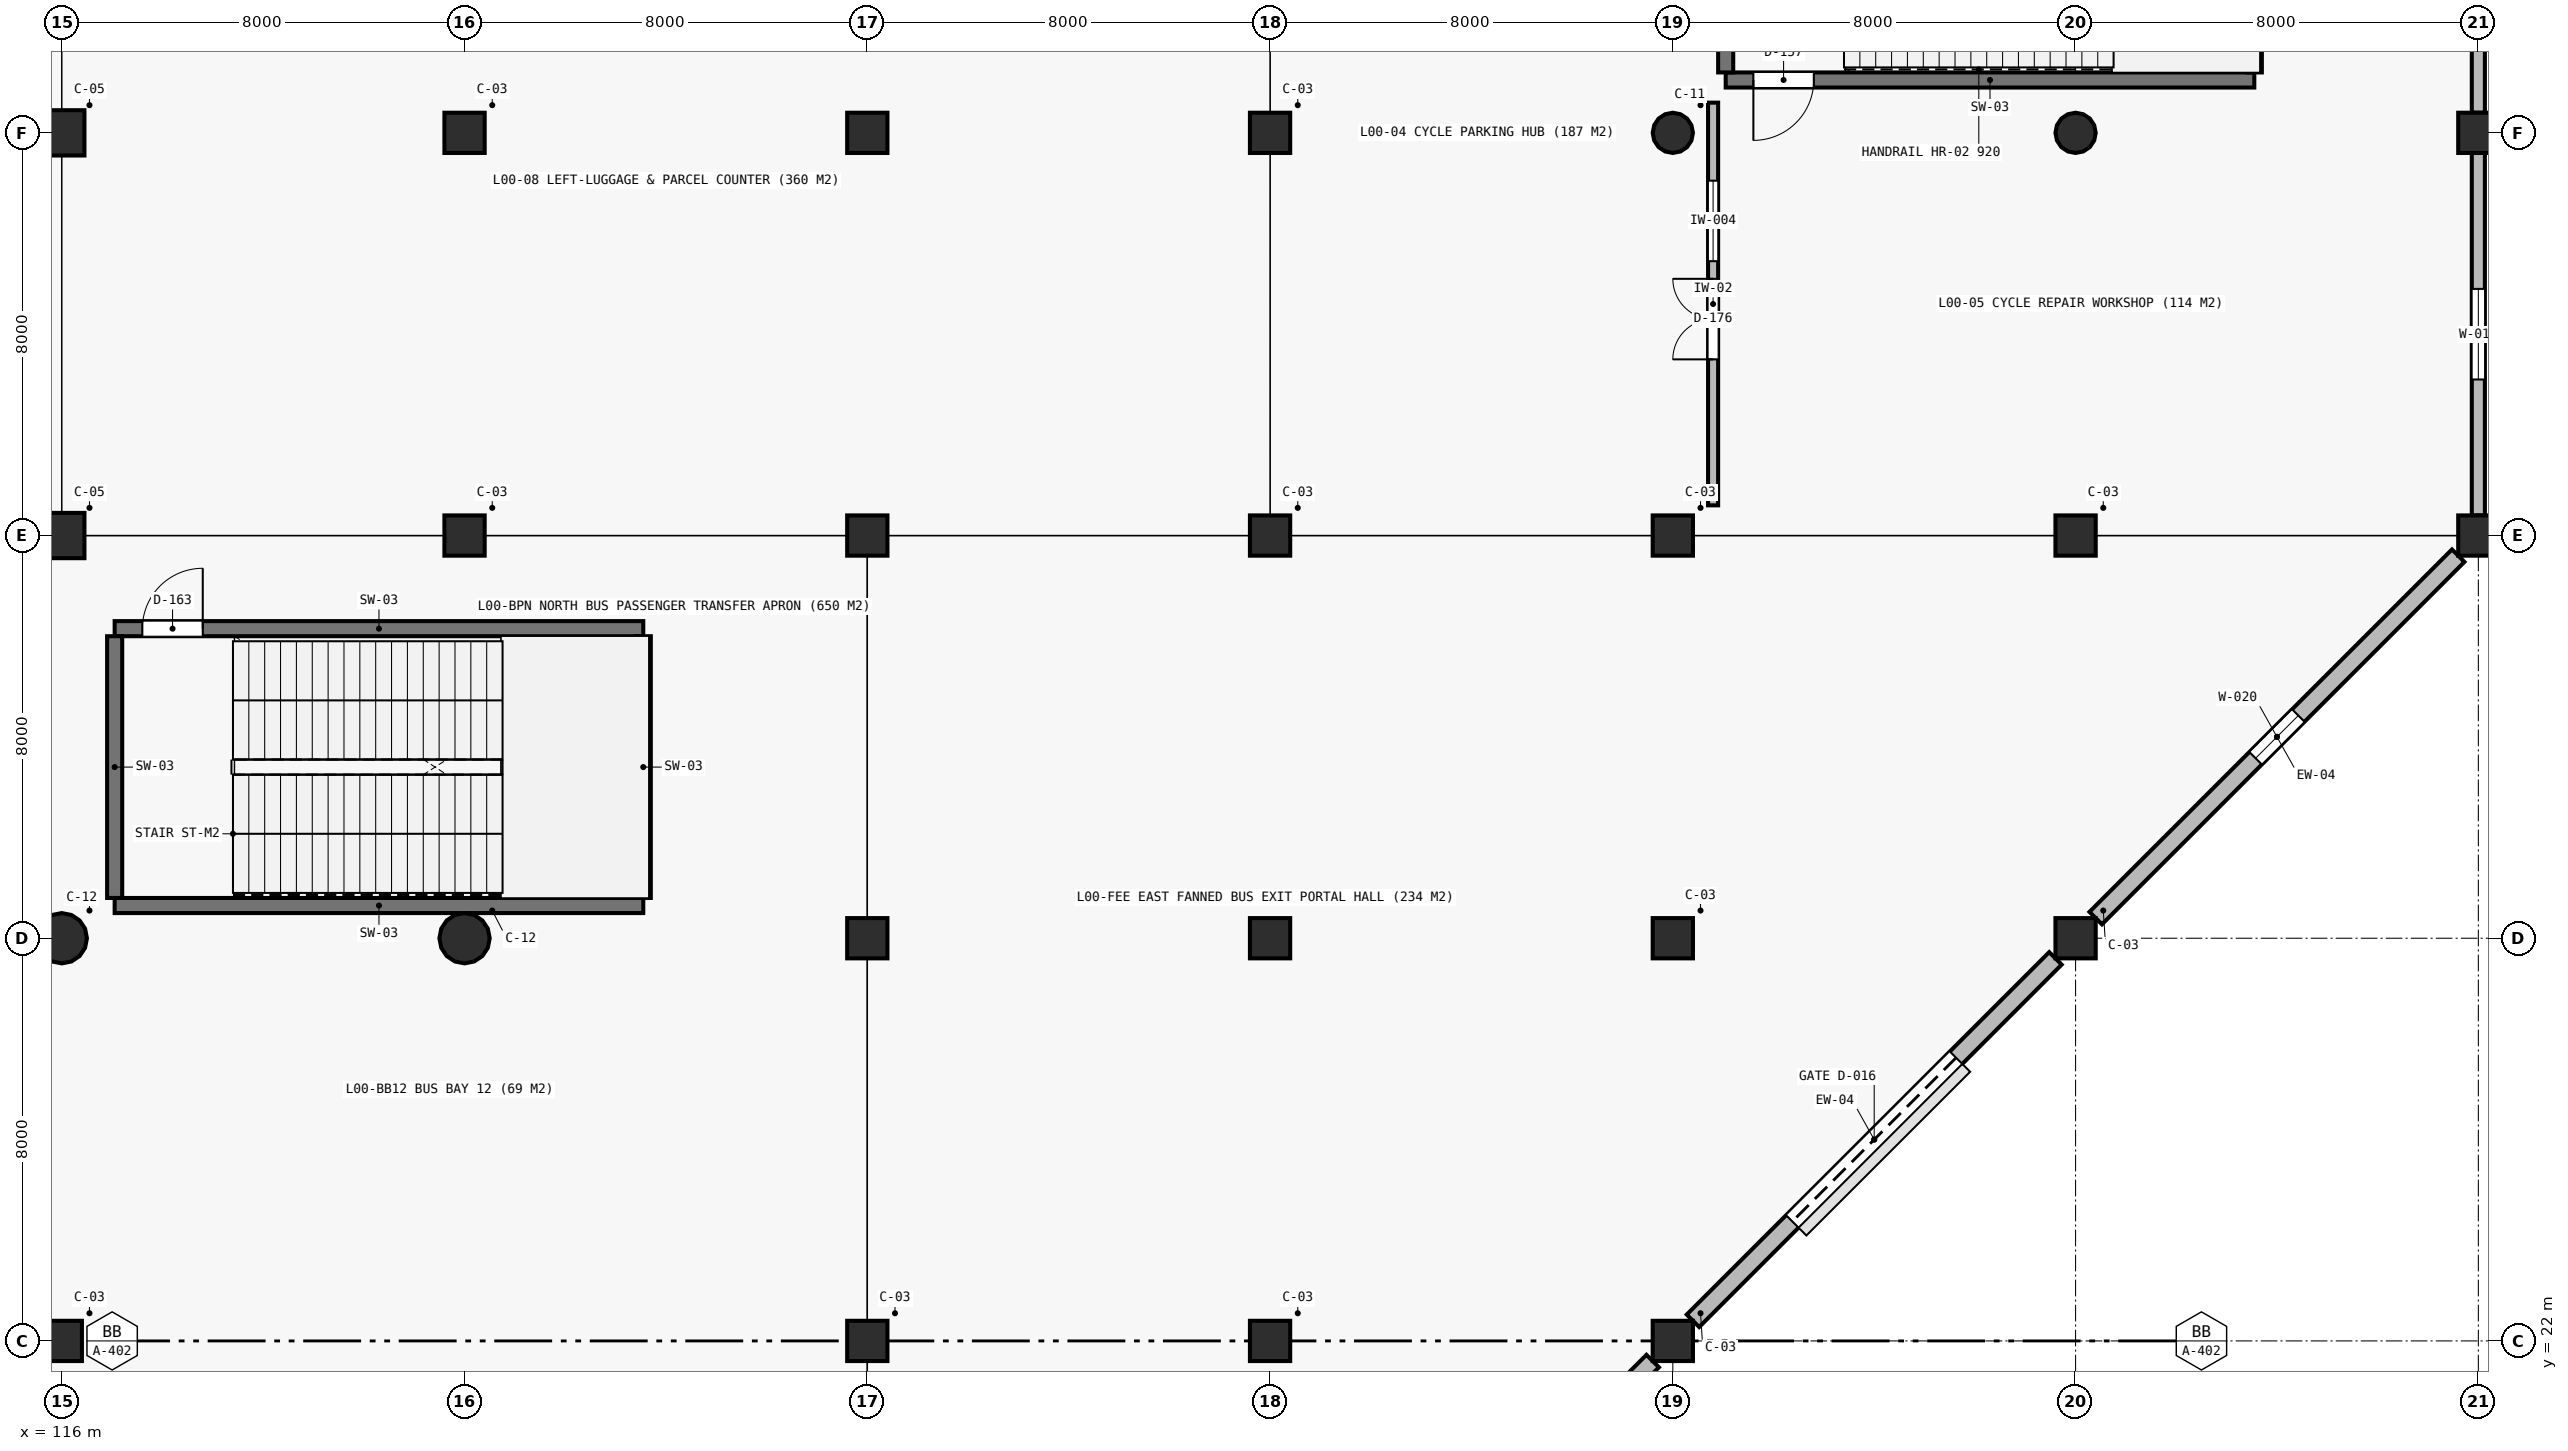
"""IFC4 building model, lengths in metres.
Left out: names, types, materials, properties, quantities, classifications, styles, units other than length and angle.
Written with IfcOpenShell. Run it as: python <this file> out.ifc"""

import sys

from ifc_helpers import new_model, si_unit, direction, frame, frame_2d, origin, origin_2d, place, context, subcontext, project, spatial, rectangle, circle, extrude, element, fill, save


model = new_model("IFC4")
c1 = context("Model", 3, precision=1e-05, world=origin(), true_north=direction((0.0, 1.0)))
c2 = subcontext(c1, "Body", "Model", "MODEL_VIEW")
j1 = project(units=[si_unit("LENGTHUNIT", "METRE"), si_unit("PLANEANGLEUNIT", "RADIAN")], contexts=[c1])
p1 = place(None, origin())
s1 = spatial("IfcSite", under=j1, at=p1, CompositionType="ELEMENT")
p2 = place(p1, origin())
s2 = spatial("IfcBuilding", under=s1, at=p2, CompositionType="ELEMENT")
p3 = place(p2, origin())
s3 = spatial("IfcBuildingStorey", under=s2, at=p3, CompositionType="ELEMENT", Elevation=0.0)
p4 = place(p3, frame((116.0, 22.0, 0.0), z_axis=(0.0, 0.0, 1.0), x_axis=(1.0, 0.0, 0.0)))
e1 = element("IfcColumn", 1, at=p4, inside=s3, PredefinedType="COLUMN", context=c2, shape_type="SweptSolid", body=[
    extrude(rectangle(XDim=0.8, YDim=0.8, at=origin_2d()), origin(), (0.0, 0.0, 1.0), 6.6),
])
p5 = place(p3, frame((116.0, 30.0, 0.0), z_axis=(0.0, 0.0, 1.0), x_axis=(1.0, 0.0, 0.0)))
e2 = element("IfcColumn", 2, at=p5, inside=s3, PredefinedType="COLUMN", context=c2, shape_type="SweptSolid", body=[
    extrude(circle(Radius=0.5, at=origin_2d()), origin(), (0.0, 0.0, 1.0), 6.02),
])
for number, where, z_axis, x_axis in (
    (3, (116.0, 38.0, 0.0), (0.0, 0.0, 1.0), (1.0, 0.0, 0.0)),
    (4, (116.0, 46.0, 0.0), (0.0, 0.0, 1.0), (1.0, 0.0, 0.0)),
):
    element("IfcColumn", number, at=place(p3, frame(where, z_axis=z_axis, x_axis=x_axis)), inside=s3, PredefinedType="COLUMN", context=c2, shape_type="SweptSolid", body=[
        extrude(rectangle(XDim=0.9, YDim=0.9, at=origin_2d()), origin(), (0.0, 0.0, 1.0), 6.02),
    ])
p6 = place(p3, frame((124.0, 30.0, 0.0), z_axis=(0.0, 0.0, 1.0), x_axis=(1.0, 0.0, 0.0)))
e5 = element("IfcColumn", 5, at=p6, inside=s3, PredefinedType="COLUMN", context=c2, shape_type="SweptSolid", body=[
    extrude(circle(Radius=0.5, at=origin_2d()), origin(), (0.0, 0.0, 1.0), 6.02),
])
for number, where, z_axis, x_axis in (
    (6, (124.0, 38.0, 0.0), (0.0, 0.0, 1.0), (1.0, 0.0, 0.0)),
    (7, (124.0, 46.0, 0.0), (0.0, 0.0, 1.0), (1.0, 0.0, 0.0)),
):
    element("IfcColumn", number, at=place(p3, frame(where, z_axis=z_axis, x_axis=x_axis)), inside=s3, PredefinedType="COLUMN", context=c2, shape_type="SweptSolid", body=[
        extrude(rectangle(XDim=0.8, YDim=0.8, at=origin_2d()), origin(), (0.0, 0.0, 1.0), 6.02),
    ])
p7 = place(p3, frame((132.0, 22.0, 0.0), z_axis=(0.0, 0.0, 1.0), x_axis=(1.0, 0.0, 0.0)))
e8 = element("IfcColumn", 8, at=p7, inside=s3, PredefinedType="COLUMN", context=c2, shape_type="SweptSolid", body=[
    extrude(rectangle(XDim=0.8, YDim=0.8, at=origin_2d()), origin(), (0.0, 0.0, 1.0), 6.6),
])
for number, where, z_axis, x_axis in (
    (9, (132.0, 30.0, 0.0), (0.0, 0.0, 1.0), (1.0, 0.0, 0.0)),
    (10, (132.0, 38.0, 0.0), (0.0, 0.0, 1.0), (1.0, 0.0, 0.0)),
    (11, (132.0, 46.0, 0.0), (0.0, 0.0, 1.0), (1.0, 0.0, 0.0)),
):
    element("IfcColumn", number, at=place(p3, frame(where, z_axis=z_axis, x_axis=x_axis)), inside=s3, PredefinedType="COLUMN", context=c2, shape_type="SweptSolid", body=[
        extrude(rectangle(XDim=0.8, YDim=0.8, at=origin_2d()), origin(), (0.0, 0.0, 1.0), 6.02),
    ])
for number, where, z_axis, x_axis in (
    (12, (140.0, 22.0, 0.0), (0.0, 0.0, 1.0), (1.0, 0.0, 0.0)),
    (13, (140.0, 30.0, 0.0), (0.0, 0.0, 1.0), (1.0, 0.0, 0.0)),
):
    element("IfcColumn", number, at=place(p3, frame(where, z_axis=z_axis, x_axis=x_axis)), inside=s3, PredefinedType="COLUMN", context=c2, shape_type="SweptSolid", body=[
        extrude(rectangle(XDim=0.8, YDim=0.8, at=origin_2d()), origin(), (0.0, 0.0, 1.0), 6.6),
    ])
for number, where, z_axis, x_axis in (
    (14, (140.0, 38.0, 0.0), (0.0, 0.0, 1.0), (1.0, 0.0, 0.0)),
    (15, (140.0, 46.0, 0.0), (0.0, 0.0, 1.0), (1.0, 0.0, 0.0)),
):
    element("IfcColumn", number, at=place(p3, frame(where, z_axis=z_axis, x_axis=x_axis)), inside=s3, PredefinedType="COLUMN", context=c2, shape_type="SweptSolid", body=[
        extrude(rectangle(XDim=0.8, YDim=0.8, at=origin_2d()), origin(), (0.0, 0.0, 1.0), 6.02),
    ])
for number, where, z_axis, x_axis in (
    (16, (148.0, 22.0, 0.0), (0.0, 0.0, 1.0), (1.0, 0.0, 0.0)),
    (17, (148.0, 30.0, 0.0), (0.0, 0.0, 1.0), (1.0, 0.0, 0.0)),
):
    element("IfcColumn", number, at=place(p3, frame(where, z_axis=z_axis, x_axis=x_axis)), inside=s3, PredefinedType="COLUMN", context=c2, shape_type="SweptSolid", body=[
        extrude(rectangle(XDim=0.8, YDim=0.8, at=origin_2d()), origin(), (0.0, 0.0, 1.0), 6.6),
    ])
p8 = place(p3, frame((148.0, 38.0, 0.0), z_axis=(0.0, 0.0, 1.0), x_axis=(1.0, 0.0, 0.0)))
e18 = element("IfcColumn", 18, at=p8, inside=s3, PredefinedType="COLUMN", context=c2, shape_type="SweptSolid", body=[
    extrude(rectangle(XDim=0.8, YDim=0.8, at=origin_2d()), origin(), (0.0, 0.0, 1.0), 6.02),
])
p9 = place(p3, frame((148.0, 46.0, 0.0), z_axis=(0.0, 0.0, 1.0), x_axis=(1.0, 0.0, 0.0)))
e19 = element("IfcColumn", 19, at=p9, inside=s3, PredefinedType="COLUMN", context=c2, shape_type="SweptSolid", body=[
    extrude(circle(Radius=0.4, at=origin_2d()), origin(), (0.0, 0.0, 1.0), 6.02),
])
p10 = place(p3, frame((156.0, 30.0, 0.0), z_axis=(0.0, 0.0, 1.0), x_axis=(1.0, 0.0, 0.0)))
e20 = element("IfcColumn", 20, at=p10, inside=s3, PredefinedType="COLUMN", context=c2, shape_type="SweptSolid", body=[
    extrude(rectangle(XDim=0.8, YDim=0.8, at=origin_2d()), origin(), (0.0, 0.0, 1.0), 6.6),
])
p11 = place(p3, frame((156.0, 38.0, 0.0), z_axis=(0.0, 0.0, 1.0), x_axis=(1.0, 0.0, 0.0)))
e21 = element("IfcColumn", 21, at=p11, inside=s3, PredefinedType="COLUMN", context=c2, shape_type="SweptSolid", body=[
    extrude(rectangle(XDim=0.8, YDim=0.8, at=origin_2d()), origin(), (0.0, 0.0, 1.0), 6.02),
])
p12 = place(p3, frame((156.0, 46.0, 0.0), z_axis=(0.0, 0.0, 1.0), x_axis=(1.0, 0.0, 0.0)))
e22 = element("IfcColumn", 22, at=p12, inside=s3, PredefinedType="COLUMN", context=c2, shape_type="SweptSolid", body=[
    extrude(circle(Radius=0.4, at=origin_2d()), origin(), (0.0, 0.0, 1.0), 6.02),
])
for number, where, z_axis, x_axis in (
    (23, (164.0, 38.0, 0.0), (0.0, 0.0, 1.0), (1.0, 0.0, 0.0)),
    (24, (164.0, 46.0, 0.0), (0.0, 0.0, 1.0), (1.0, 0.0, 0.0)),
):
    element("IfcColumn", number, at=place(p3, frame(where, z_axis=z_axis, x_axis=x_axis)), inside=s3, PredefinedType="COLUMN", context=c2, shape_type="SweptSolid", body=[
        extrude(rectangle(XDim=0.8, YDim=0.8, at=origin_2d()), origin(), (0.0, 0.0, 1.0), 6.02),
    ])
p13 = place(p3, frame((149.05, 47.05, 0.0), z_axis=(0.0, 0.0, 1.0), x_axis=(1.0, 0.0, 0.0)))
e25 = element("IfcWall", 25, at=p13, inside=s3, PredefinedType="SHEAR", context=c2, shape_type="SweptSolid", body=[
    extrude(rectangle(XDim=10.5, YDim=0.3, at=frame_2d((5.25, 0.0))), origin(), (0.0, 0.0, 1.0), 6.02),
])
p14 = place(p13, frame((0.55, 0.0, 0.0)))
e26 = element("IfcOpeningElement", 26, at=p14, cuts=e25, PredefinedType="OPENING", context=c2, shape_type="SweptSolid", body=[
    extrude(rectangle(XDim=1.2, YDim=2.2, at=frame_2d((0.6, 1.1))), frame((0.0, 0.16, 0.0), z_axis=(0.0, -1.0, 0.0), x_axis=(1.0, 0.0, 0.0)), (0.0, 0.0, 1.0), 0.32),
])
for number, where, z_axis, x_axis in (
    (27, (149.05, 47.2, 0.0), (0.0, 0.0, 1.0), (0.0, 1.0, 0.0)),
    (28, (159.55, 47.2, 0.0), (0.0, 0.0, 1.0), (0.0, 1.0, 0.0)),
):
    element("IfcWall", number, at=place(p3, frame(where, z_axis=z_axis, x_axis=x_axis)), inside=s3, PredefinedType="SHEAR", context=c2, shape_type="SweptSolid", body=[
        extrude(rectangle(XDim=5.2, YDim=0.3, at=frame_2d((2.6, 0.0))), origin(), (0.0, 0.0, 1.0), 6.02),
    ])
p15 = place(p3, frame((117.05, 36.15, 0.0), z_axis=(0.0, 0.0, 1.0), x_axis=(1.0, 0.0, 0.0)))
e29 = element("IfcWall", 29, at=p15, inside=s3, PredefinedType="SHEAR", context=c2, shape_type="SweptSolid", body=[
    extrude(rectangle(XDim=10.5, YDim=0.3, at=frame_2d((5.25, 0.0))), origin(), (0.0, 0.0, 1.0), 6.02),
])
p16 = place(p15, frame((0.55, 0.0, 0.0)))
e30 = element("IfcOpeningElement", 30, at=p16, cuts=e29, PredefinedType="OPENING", context=c2, shape_type="SweptSolid", body=[
    extrude(rectangle(XDim=1.2, YDim=2.2, at=frame_2d((0.6, 1.1))), frame((0.0, 0.16, 0.0), z_axis=(0.0, -1.0, 0.0), x_axis=(1.0, 0.0, 0.0)), (0.0, 0.0, 1.0), 0.32),
])
p17 = place(p3, frame((117.05, 30.65, 0.0), z_axis=(0.0, 0.0, 1.0), x_axis=(1.0, 0.0, 0.0)))
e31 = element("IfcWall", 31, at=p17, inside=s3, PredefinedType="SHEAR", context=c2, shape_type="SweptSolid", body=[
    extrude(rectangle(XDim=10.5, YDim=0.3, at=frame_2d((5.25, 0.0))), origin(), (0.0, 0.0, 1.0), 6.02),
])
for number, where, z_axis, x_axis in (
    (32, (117.05, 30.8, 0.0), (0.0, 0.0, 1.0), (0.0, 1.0, 0.0)),
    (33, (127.55, 30.8, 0.0), (0.0, 0.0, 1.0), (0.0, 1.0, 0.0)),
):
    element("IfcWall", number, at=place(p3, frame(where, z_axis=z_axis, x_axis=x_axis)), inside=s3, PredefinedType="SHEAR", context=c2, shape_type="SweptSolid", body=[
        extrude(rectangle(XDim=5.2, YDim=0.3, at=frame_2d((2.6, 0.0))), origin(), (0.0, 0.0, 1.0), 6.02),
    ])
p18 = place(p3, frame((164.0, 53.6, 0.0), z_axis=(0.0, 0.0, 1.0), x_axis=(0.0, -1.0, 0.0)))
e34 = element("IfcWall", 34, at=p18, inside=s3, PredefinedType="STANDARD", context=c2, shape_type="SweptSolid", body=[
    extrude(rectangle(XDim=7.2, YDim=0.26, at=frame_2d((3.6, 0.0))), origin(), (0.0, 0.0, 1.0), 5.408),
])
p19 = place(p18, frame((2.525, 0.0, 0.95)))
e35 = element("IfcOpeningElement", 35, at=p19, cuts=e34, PredefinedType="OPENING", context=c2, shape_type="SweptSolid", body=[
    extrude(rectangle(XDim=2.15, YDim=1.5, at=frame_2d((1.075, 0.75))), frame((0.0, 0.14, 0.0), z_axis=(0.0, -1.0, 0.0), x_axis=(1.0, 0.0, 0.0)), (0.0, 0.0, 1.0), 0.28),
])
p20 = place(p3, frame((164.0, 45.6, 0.0), z_axis=(0.0, 0.0, 1.0), x_axis=(0.0, -1.0, 0.0)))
e36 = element("IfcWall", 36, at=p20, inside=s3, PredefinedType="STANDARD", context=c2, shape_type="SweptSolid", body=[
    extrude(rectangle(XDim=7.2, YDim=0.26, at=frame_2d((3.6, 0.0))), origin(), (0.0, 0.0, 1.0), 5.408),
])
p21 = place(p20, frame((2.7, 0.0, 0.95)))
e37 = element("IfcOpeningElement", 37, at=p21, cuts=e36, PredefinedType="OPENING", context=c2, shape_type="SweptSolid", body=[
    extrude(rectangle(XDim=1.8, YDim=1.6, at=frame_2d((0.9, 0.8))), frame((0.0, 0.14, 0.0), z_axis=(0.0, -1.0, 0.0), x_axis=(1.0, 0.0, 0.0)), (0.0, 0.0, 1.0), 0.28),
])
p22 = place(p3, frame((163.6, 37.6, 0.0), z_axis=(0.0, 0.0, 1.0), x_axis=(-0.707106781187, -0.707106781187, 0.0)))
e38 = element("IfcWall", 38, at=p22, inside=s3, PredefinedType="STANDARD", context=c2, shape_type="SweptSolid", body=[
    extrude(rectangle(XDim=10.183, YDim=0.35, at=frame_2d((5.091, 0.0))), origin(), (0.0, 0.0, 1.0), 5.6),
])
p23 = place(p22, frame((4.491, 0.0, 0.95)))
e39 = element("IfcOpeningElement", 39, at=p23, cuts=e38, PredefinedType="OPENING", context=c2, shape_type="SweptSolid", body=[
    extrude(rectangle(XDim=1.2, YDim=2.4, at=frame_2d((0.6, 1.2))), frame((0.0, 0.185, 0.0), z_axis=(0.0, -1.0, 0.0), x_axis=(1.0, 0.0, 0.0)), (0.0, 0.0, 1.0), 0.37),
])
p24 = place(p3, frame((155.6, 29.6, 0.0), z_axis=(0.0, 0.0, 1.0), x_axis=(-0.707106781187, -0.707106781187, 0.0)))
e40 = element("IfcWall", 40, at=p24, inside=s3, PredefinedType="STANDARD", context=c2, shape_type="SweptSolid", body=[
    extrude(rectangle(XDim=10.183, YDim=0.35, at=frame_2d((5.091, 0.0))), origin(), (0.0, 0.0, 1.0), 5.6),
])
p25 = place(p24, frame((2.791, 0.0, 0.0)))
e41 = element("IfcOpeningElement", 41, at=p25, cuts=e40, PredefinedType="OPENING", context=c2, shape_type="SweptSolid", body=[
    extrude(rectangle(XDim=4.6, YDim=4.4, at=frame_2d((2.3, 2.2))), frame((0.0, 0.185, 0.0), z_axis=(0.0, -1.0, 0.0), x_axis=(1.0, 0.0, 0.0)), (0.0, 0.0, 1.0), 0.37),
])
p26 = place(p3, frame((147.6, 21.6, 0.0), z_axis=(0.0, 0.0, 1.0), x_axis=(-0.707106781187, -0.707106781187, 0.0)))
e42 = element("IfcWall", 42, at=p26, inside=s3, PredefinedType="STANDARD", context=c2, shape_type="SweptSolid", body=[
    extrude(rectangle(XDim=10.183, YDim=0.35, at=frame_2d((5.091, 0.0))), origin(), (0.0, 0.0, 1.0), 5.6),
])
p27 = place(p26, frame((2.791, 0.0, 0.0)))
e43 = element("IfcOpeningElement", 43, at=p27, cuts=e42, PredefinedType="OPENING", context=c2, shape_type="SweptSolid", body=[
    extrude(rectangle(XDim=4.6, YDim=4.4, at=frame_2d((2.3, 2.2))), frame((0.0, 0.185, 0.0), z_axis=(0.0, -1.0, 0.0), x_axis=(1.0, 0.0, 0.0)), (0.0, 0.0, 1.0), 0.37),
])
p28 = place(p3, frame((148.8, 38.6, 0.0), z_axis=(0.0, 0.0, 1.0), x_axis=(0.0, 1.0, 0.0)))
e44 = element("IfcWall", 44, at=p28, inside=s3, PredefinedType="PARTITIONING", context=c2, shape_type="SweptSolid", body=[
    extrude(rectangle(XDim=8.0, YDim=0.2, at=frame_2d((4.0, 0.0))), origin(), (0.0, 0.0, 1.0), 6.02),
])
p29 = place(p28, frame((2.9, 0.0, 0.0)))
e45 = element("IfcOpeningElement", 45, at=p29, cuts=e44, PredefinedType="OPENING", context=c2, shape_type="SweptSolid", body=[
    extrude(rectangle(XDim=1.6, YDim=2.2, at=frame_2d((0.8, 1.1))), frame((0.0, 0.11, 0.0), z_axis=(0.0, -1.0, 0.0), x_axis=(1.0, 0.0, 0.0)), (0.0, 0.0, 1.0), 0.22),
])
p30 = place(p28, frame((4.85, 0.0, 0.95)))
e46 = element("IfcOpeningElement", 46, at=p30, cuts=e44, PredefinedType="OPENING", context=c2, shape_type="SweptSolid", body=[
    extrude(rectangle(XDim=1.6, YDim=1.3, at=frame_2d((0.8, 0.65))), frame((0.0, 0.11, 0.0), z_axis=(0.0, -1.0, 0.0), x_axis=(1.0, 0.0, 0.0)), (0.0, 0.0, 1.0), 0.22),
])
p31 = place(p21, origin())
e47 = element("IfcWindow", 47, at=p31, inside=s3, PartitioningType="SINGLE_PANEL", PredefinedType="WINDOW", context=c2, shape_type="SweptSolid", body=[
    extrude(rectangle(XDim=1.8, YDim=1.6, at=frame_2d((0.9, 0.8))), frame((0.0, 0.03, 0.0), z_axis=(0.0, -1.0, 0.0), x_axis=(1.0, 0.0, 0.0)), (0.0, 0.0, 1.0), 0.06),
])
fill(e37, e47)
p32 = place(p23, origin())
e48 = element("IfcWindow", 48, at=p32, inside=s3, PartitioningType="SINGLE_PANEL", PredefinedType="WINDOW", context=c2, shape_type="SweptSolid", body=[
    extrude(rectangle(XDim=1.2, YDim=2.4, at=frame_2d((0.6, 1.2))), frame((0.0, 0.03, 0.0), z_axis=(0.0, -1.0, 0.0), x_axis=(1.0, 0.0, 0.0)), (0.0, 0.0, 1.0), 0.06),
])
fill(e39, e48)
p33 = place(p25, origin())
e49 = element("IfcDoor", 49, at=p33, inside=s3, OperationType="ROLLINGUP", PredefinedType="GATE", context=c2, shape_type="SweptSolid", body=[
    extrude(rectangle(XDim=4.6, YDim=4.4, at=frame_2d((2.3, 2.2))), frame((0.0, 0.025, 0.0), z_axis=(0.0, -1.0, 0.0), x_axis=(1.0, 0.0, 0.0)), (0.0, 0.0, 1.0), 0.05),
])
fill(e41, e49)
p34 = place(p14, frame((1.2, 0.0, 0.0), z_axis=(0.0, 0.0, 1.0), x_axis=(-1.0, 0.0, 0.0)))
e50 = element("IfcDoor", 50, at=p34, inside=s3, OperationType="SINGLE_SWING_RIGHT", PredefinedType="DOOR", context=c2, shape_type="SweptSolid", body=[
    extrude(rectangle(XDim=1.2, YDim=2.2, at=frame_2d((0.6, 1.1))), frame((0.0, 0.025, 0.0), z_axis=(0.0, -1.0, 0.0), x_axis=(1.0, 0.0, 0.0)), (0.0, 0.0, 1.0), 0.05),
])
fill(e26, e50)
p35 = place(p16, origin())
e51 = element("IfcDoor", 51, at=p35, inside=s3, OperationType="SINGLE_SWING_RIGHT", PredefinedType="DOOR", context=c2, shape_type="SweptSolid", body=[
    extrude(rectangle(XDim=1.2, YDim=2.2, at=frame_2d((0.6, 1.1))), frame((0.0, 0.025, 0.0), z_axis=(0.0, -1.0, 0.0), x_axis=(1.0, 0.0, 0.0)), (0.0, 0.0, 1.0), 0.05),
])
fill(e30, e51)
p36 = place(p29, origin())
e52 = element("IfcDoor", 52, at=p36, inside=s3, OperationType="DOUBLE_DOOR_SINGLE_SWING", PredefinedType="DOOR", context=c2, shape_type="SweptSolid", body=[
    extrude(rectangle(XDim=1.6, YDim=2.2, at=frame_2d((0.8, 1.1))), frame((0.0, 0.025, 0.0), z_axis=(0.0, -1.0, 0.0), x_axis=(1.0, 0.0, 0.0)), (0.0, 0.0, 1.0), 0.05),
])
fill(e45, e52)
p37 = place(p30, origin())
e53 = element("IfcWindow", 53, at=p37, inside=s3, PartitioningType="SINGLE_PANEL", PredefinedType="WINDOW", context=c2, shape_type="SweptSolid", body=[
    extrude(rectangle(XDim=1.6, YDim=1.3, at=frame_2d((0.8, 0.65))), frame((0.0, 0.03, 0.0), z_axis=(0.0, -1.0, 0.0), x_axis=(1.0, 0.0, 0.0)), (0.0, 0.0, 1.0), 0.06),
])
fill(e46, e53)
save(model, sys.argv[1])
